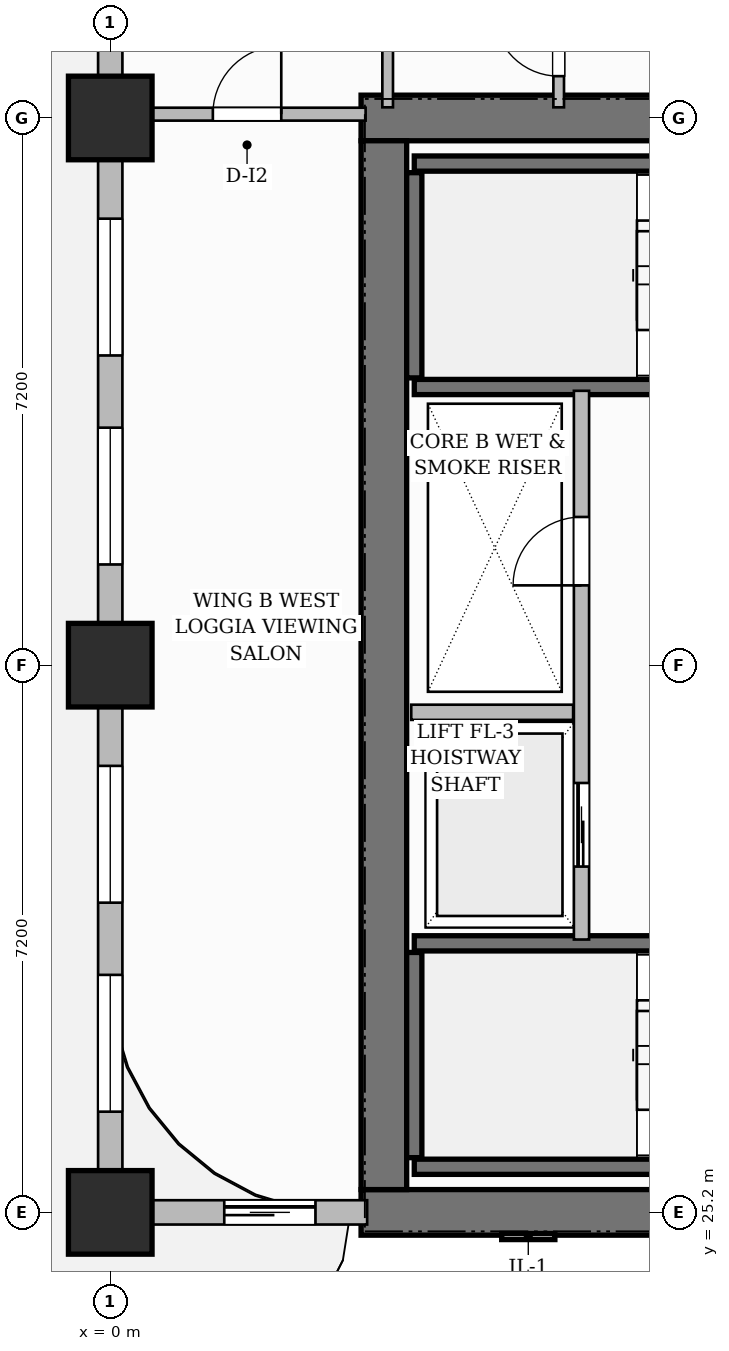
"""IFC4 building model, lengths in metres.
Left out: names, types, materials, properties, quantities, classifications, styles, units other than length and angle.
Written with IfcOpenShell. Run it as: python <this file> out.ifc"""

import sys

from ifc_helpers import new_model, si_unit, direction, frame, frame_2d, origin, origin_2d, place, context, subcontext, project, spatial, rectangle, extrude, source, transform, mapped, element, fill, save


model = new_model("IFC4")
c1 = context("Model", 3, precision=1e-05, world=origin(), true_north=direction((0.0, 1.0)))
c2 = subcontext(c1, "Body", "Model", "MODEL_VIEW")
j1 = project(units=[si_unit("LENGTHUNIT", "METRE"), si_unit("PLANEANGLEUNIT", "RADIAN")], contexts=[c1])
p1 = place(None, origin())
s1 = spatial("IfcSite", under=j1, at=p1, CompositionType="ELEMENT")
p2 = place(p1, origin())
s2 = spatial("IfcBuilding", under=s1, at=p2, CompositionType="ELEMENT")
p3 = place(p2, frame((0.0, 0.0, 32.4)))
s3 = spatial("IfcBuildingStorey", under=s2, at=p3, CompositionType="ELEMENT", Elevation=32.4)
for number, where, z_axis, x_axis in (
    (1, (3.3, 25.2, 0.0), (0.0, 0.0, 1.0), (1.0, 0.0, 0.0)),
    (2, (3.3, 39.6, 0.0), (0.0, 0.0, 1.0), (1.0, 0.0, 0.0)),
):
    element("IfcWall", number, at=place(p3, frame(where, z_axis=z_axis, x_axis=x_axis)), inside=s3, PredefinedType="SHEAR", context=c2, shape_type="SweptSolid", body=[
        extrude(rectangle(XDim=8.4, YDim=0.6, at=frame_2d((4.2, 0.0))), origin(), (0.0, 0.0, 1.0), 3.7),
    ])
p4 = place(p3, frame((3.6, 25.5, 0.0), z_axis=(0.0, 0.0, 1.0), x_axis=(0.0, 1.0, 0.0)))
e3 = element("IfcWall", 3, at=p4, inside=s3, PredefinedType="SHEAR", context=c2, shape_type="SweptSolid", body=[
    extrude(rectangle(XDim=13.8, YDim=0.6, at=frame_2d((6.9, 0.0))), origin(), (0.0, 0.0, 1.0), 3.7),
])
m1 = source(origin(), c2, "Body", "SweptSolid", [
    extrude(rectangle(XDim=1.1, YDim=1.1, at=origin_2d()), origin(), (0.0, 0.0, 1.0), 3.7),
])
for number, where, z_axis, x_axis in (
    (4, (0.0, 25.2, 0.0), (0.0, 0.0, 1.0), (1.0, 0.0, 0.0)),
    (5, (0.0, 32.4, 0.0), (0.0, 0.0, 1.0), (1.0, 0.0, 0.0)),
    (6, (0.0, 39.6, 0.0), (0.0, 0.0, 1.0), (1.0, 0.0, 0.0)),
):
    element("IfcColumn", number, at=place(p3, frame(where, z_axis=z_axis, x_axis=x_axis)), inside=s3, PredefinedType="COLUMN", context=c2, shape_type="MappedRepresentation", body=[
        mapped(m1, transform((0.0, 0.0, 0.0), scale=1.0)),
    ])
p5 = place(p3, frame((4.0, 25.8, 0.0), z_axis=(0.0, 0.0, 1.0), x_axis=(1.0, 0.0, 0.0)))
e7 = element("IfcWall", 7, at=p5, inside=s3, PredefinedType="SHEAR", context=c2, shape_type="SweptSolid", body=[
    extrude(rectangle(XDim=7.1, YDim=0.2, at=frame_2d((3.55, 0.0))), origin(), (0.0, 0.0, 1.0), 3.7),
])
p6 = place(p3, frame((4.0, 25.92, 0.0), z_axis=(0.0, 0.0, 1.0), x_axis=(0.0, 1.0, 0.0)))
e8 = element("IfcWall", 8, at=p6, inside=s3, PredefinedType="SHEAR", context=c2, shape_type="SweptSolid", body=[
    extrude(rectangle(XDim=2.7, YDim=0.2, at=frame_2d((1.35, 0.0))), origin(), (0.0, 0.0, 1.0), 3.7),
])
p7 = place(p3, frame((4.0, 28.74, 0.0), z_axis=(0.0, 0.0, 1.0), x_axis=(1.0, 0.0, 0.0)))
e9 = element("IfcWall", 9, at=p7, inside=s3, PredefinedType="SHEAR", context=c2, shape_type="SweptSolid", body=[
    extrude(rectangle(XDim=7.1, YDim=0.2, at=frame_2d((3.55, 0.0))), origin(), (0.0, 0.0, 1.0), 3.7),
])
p8 = place(p7, frame((5.815, 0.0, 0.0)))
e10 = element("IfcOpeningElement", 10, at=p8, cuts=e9, PredefinedType="OPENING", context=c2, shape_type="SweptSolid", body=[
    extrude(rectangle(XDim=1.05, YDim=2.2, at=frame_2d((0.525, 1.1))), frame((0.0, 0.11, 0.0), z_axis=(0.0, -1.0, 0.0), x_axis=(1.0, 0.0, 0.0)), (0.0, 0.0, 1.0), 0.22),
])
p9 = place(p3, frame((4.0, 39.0, 0.0), z_axis=(0.0, 0.0, 1.0), x_axis=(1.0, 0.0, 0.0)))
e11 = element("IfcWall", 11, at=p9, inside=s3, PredefinedType="SHEAR", context=c2, shape_type="SweptSolid", body=[
    extrude(rectangle(XDim=7.1, YDim=0.2, at=frame_2d((3.55, 0.0))), origin(), (0.0, 0.0, 1.0), 3.7),
])
p10 = place(p3, frame((4.0, 36.18, 0.0), z_axis=(0.0, 0.0, 1.0), x_axis=(0.0, 1.0, 0.0)))
e12 = element("IfcWall", 12, at=p10, inside=s3, PredefinedType="SHEAR", context=c2, shape_type="SweptSolid", body=[
    extrude(rectangle(XDim=2.7, YDim=0.2, at=frame_2d((1.35, 0.0))), origin(), (0.0, 0.0, 1.0), 3.7),
])
p11 = place(p3, frame((4.0, 36.06, 0.0), z_axis=(0.0, 0.0, 1.0), x_axis=(1.0, 0.0, 0.0)))
e13 = element("IfcWall", 13, at=p11, inside=s3, PredefinedType="SHEAR", context=c2, shape_type="SweptSolid", body=[
    extrude(rectangle(XDim=7.1, YDim=0.2, at=frame_2d((3.55, 0.0))), origin(), (0.0, 0.0, 1.0), 3.7),
])
p12 = place(p11, frame((5.815, 0.0, 0.0)))
e14 = element("IfcOpeningElement", 14, at=p12, cuts=e13, PredefinedType="OPENING", context=c2, shape_type="SweptSolid", body=[
    extrude(rectangle(XDim=1.05, YDim=2.2, at=frame_2d((0.525, 1.1))), frame((0.0, 0.11, 0.0), z_axis=(0.0, -1.0, 0.0), x_axis=(1.0, 0.0, 0.0)), (0.0, 0.0, 1.0), 0.22),
])
p13 = place(p3, frame((6.2, 28.79, 0.0), z_axis=(0.0, 0.0, 1.0), x_axis=(0.0, 1.0, 0.0)))
e15 = element("IfcWall", 15, at=p13, inside=s3, PredefinedType="PARTITIONING", context=c2, shape_type="SweptSolid", body=[
    extrude(rectangle(XDim=7.22, YDim=0.2, at=frame_2d((3.61, 0.0))), origin(), (0.0, 0.0, 1.0), 3.45),
])
p14 = place(p13, frame((4.66, 0.0, 0.0)))
e16 = element("IfcOpeningElement", 16, at=p14, cuts=e15, PredefinedType="OPENING", context=c2, shape_type="SweptSolid", body=[
    extrude(rectangle(XDim=0.9, YDim=2.1, at=frame_2d((0.45, 1.05))), frame((0.0, 0.11, 0.0), z_axis=(0.0, -1.0, 0.0), x_axis=(1.0, 0.0, 0.0)), (0.0, 0.0, 1.0), 0.22),
])
p15 = place(p13, frame((0.96, 0.0, 0.0)))
e17 = element("IfcOpeningElement", 17, at=p15, cuts=e15, PredefinedType="OPENING", context=c2, shape_type="SweptSolid", body=[
    extrude(rectangle(XDim=1.1, YDim=2.2, at=frame_2d((0.55, 1.1))), frame((0.0, 0.11, 0.0), z_axis=(0.0, -1.0, 0.0), x_axis=(1.0, 0.0, 0.0)), (0.0, 0.0, 1.0), 0.22),
])
p16 = place(p3, frame((3.96, 31.78, 0.0), z_axis=(0.0, 0.0, 1.0), x_axis=(1.0, 0.0, 0.0)))
e18 = element("IfcWall", 18, at=p16, inside=s3, PredefinedType="PARTITIONING", context=c2, shape_type="SweptSolid", body=[
    extrude(rectangle(XDim=2.13, YDim=0.2, at=frame_2d((1.065, 0.0))), origin(), (0.0, 0.0, 1.0), 3.45),
])
p17 = place(p3, frame((0.24, 39.65, 0.0), z_axis=(0.0, 0.0, 1.0), x_axis=(1.0, 0.0, 0.0)))
e19 = element("IfcWall", 19, at=p17, inside=s3, PredefinedType="PARTITIONING", context=c2, shape_type="SweptSolid", body=[
    extrude(rectangle(XDim=3.12, YDim=0.17, at=frame_2d((1.56, 0.0))), origin(), (0.0, 0.0, 1.0), 3.45),
])
p18 = place(p17, frame((1.11, 0.0, 0.0)))
e20 = element("IfcOpeningElement", 20, at=p18, cuts=e19, PredefinedType="OPENING", context=c2, shape_type="SweptSolid", body=[
    extrude(rectangle(XDim=0.9, YDim=2.15, at=frame_2d((0.45, 1.075))), frame((0.0, 0.095, 0.0), z_axis=(0.0, -1.0, 0.0), x_axis=(1.0, 0.0, 0.0)), (0.0, 0.0, 1.0), 0.19),
])
p19 = place(p3, frame((3.65, 39.74, 0.0), z_axis=(0.0, 0.0, 1.0), x_axis=(0.0, 1.0, 0.0)))
e21 = element("IfcWall", 21, at=p19, inside=s3, PredefinedType="PARTITIONING", context=c2, shape_type="SweptSolid", body=[
    extrude(rectangle(XDim=1.67, YDim=0.14, at=frame_2d((0.835, 0.0))), origin(), (0.0, 0.0, 1.0), 3.45),
])
p20 = place(p3, frame((5.9, 39.74, 0.0), z_axis=(0.0, 0.0, 1.0), x_axis=(0.0, 1.0, 0.0)))
e22 = element("IfcWall", 22, at=p20, inside=s3, PredefinedType="PARTITIONING", context=c2, shape_type="SweptSolid", body=[
    extrude(rectangle(XDim=1.67, YDim=0.14, at=frame_2d((0.835, 0.0))), origin(), (0.0, 0.0, 1.0), 3.45),
])
p21 = place(p20, frame((0.41, 0.0, 0.0)))
e23 = element("IfcOpeningElement", 23, at=p21, cuts=e22, PredefinedType="OPENING", context=c2, shape_type="SweptSolid", body=[
    extrude(rectangle(XDim=0.85, YDim=2.1, at=frame_2d((0.425, 1.05))), frame((0.0, 0.08, 0.0), z_axis=(0.0, -1.0, 0.0), x_axis=(1.0, 0.0, 0.0)), (0.0, 0.0, 1.0), 0.16),
])
p22 = place(p3, frame((0.0, 25.2, 0.0), z_axis=(0.0, 0.0, 1.0), x_axis=(1.0, 0.0, 0.0)))
e24 = element("IfcWall", 24, at=p22, inside=s3, PredefinedType="SOLIDWALL", context=c2, shape_type="SweptSolid", body=[
    extrude(rectangle(XDim=3.38, YDim=0.32, at=frame_2d((1.69, 0.0))), origin(), (0.0, 0.0, 1.0), 3.45),
])
p23 = place(p22, frame((1.5, 0.0, 0.0)))
e25 = element("IfcOpeningElement", 25, at=p23, cuts=e24, PredefinedType="OPENING", context=c2, shape_type="SweptSolid", body=[
    extrude(rectangle(XDim=1.2, YDim=2.2, at=frame_2d((0.6, 1.1))), frame((0.0, 0.17, 0.0), z_axis=(0.0, -1.0, 0.0), x_axis=(1.0, 0.0, 0.0)), (0.0, 0.0, 1.0), 0.34),
])
p24 = place(p3, frame((0.0, 25.25, 0.0), z_axis=(0.0, 0.0, 1.0), x_axis=(0.0, 1.0, 0.0)))
e26 = element("IfcWall", 26, at=p24, inside=s3, PredefinedType="SOLIDWALL", context=c2, shape_type="SweptSolid", body=[
    extrude(rectangle(XDim=21.5, YDim=0.32, at=frame_2d((10.75, 0.0))), origin(), (0.0, 0.0, 1.0), 2.885),
])
p25 = place(p24, frame((1.275, 0.0, 0.8)))
e27 = element("IfcOpeningElement", 27, at=p25, cuts=e26, PredefinedType="OPENING", context=c2, shape_type="SweptSolid", body=[
    extrude(rectangle(XDim=1.8, YDim=1.85, at=frame_2d((0.9, 0.925))), frame((0.0, 0.17, 0.0), z_axis=(0.0, -1.0, 0.0), x_axis=(1.0, 0.0, 0.0)), (0.0, 0.0, 1.0), 0.34),
])
p26 = place(p24, frame((4.025, 0.0, 0.8)))
e28 = element("IfcOpeningElement", 28, at=p26, cuts=e26, PredefinedType="OPENING", context=c2, shape_type="SweptSolid", body=[
    extrude(rectangle(XDim=1.8, YDim=1.85, at=frame_2d((0.9, 0.925))), frame((0.0, 0.17, 0.0), z_axis=(0.0, -1.0, 0.0), x_axis=(1.0, 0.0, 0.0)), (0.0, 0.0, 1.0), 0.34),
])
p27 = place(p24, frame((8.475, 0.0, 0.8)))
e29 = element("IfcOpeningElement", 29, at=p27, cuts=e26, PredefinedType="OPENING", context=c2, shape_type="SweptSolid", body=[
    extrude(rectangle(XDim=1.8, YDim=1.85, at=frame_2d((0.9, 0.925))), frame((0.0, 0.17, 0.0), z_axis=(0.0, -1.0, 0.0), x_axis=(1.0, 0.0, 0.0)), (0.0, 0.0, 1.0), 0.34),
])
p28 = place(p24, frame((11.225, 0.0, 0.8)))
e30 = element("IfcOpeningElement", 30, at=p28, cuts=e26, PredefinedType="OPENING", context=c2, shape_type="SweptSolid", body=[
    extrude(rectangle(XDim=1.8, YDim=1.85, at=frame_2d((0.9, 0.925))), frame((0.0, 0.17, 0.0), z_axis=(0.0, -1.0, 0.0), x_axis=(1.0, 0.0, 0.0)), (0.0, 0.0, 1.0), 0.34),
])
p29 = place(p24, frame((15.697, 0.0, 0.8)))
e31 = element("IfcOpeningElement", 31, at=p29, cuts=e26, PredefinedType="OPENING", context=c2, shape_type="SweptSolid", body=[
    extrude(rectangle(XDim=1.4, YDim=1.85, at=frame_2d((0.7, 0.925))), frame((0.0, 0.17, 0.0), z_axis=(0.0, -1.0, 0.0), x_axis=(1.0, 0.0, 0.0)), (0.0, 0.0, 1.0), 0.34),
])
p30 = place(p24, frame((18.303, 0.0, 0.8)))
e32 = element("IfcOpeningElement", 32, at=p30, cuts=e26, PredefinedType="OPENING", context=c2, shape_type="SweptSolid", body=[
    extrude(rectangle(XDim=1.8, YDim=1.85, at=frame_2d((0.9, 0.925))), frame((0.0, 0.17, 0.0), z_axis=(0.0, -1.0, 0.0), x_axis=(1.0, 0.0, 0.0)), (0.0, 0.0, 1.0), 0.34),
])
m2 = source(origin(), c2, "Body", "SweptSolid", [
    extrude(rectangle(XDim=0.9, YDim=2.1, at=frame_2d((0.45, 1.05))), frame((0.0, 0.025, 0.0), z_axis=(0.0, -1.0, 0.0), x_axis=(1.0, 0.0, 0.0)), (0.0, 0.0, 1.0), 0.05),
])
p31 = place(p14, origin())
e33 = element("IfcDoor", 33, at=p31, inside=s3, OperationType="SINGLE_SWING_LEFT", PredefinedType="DOOR", context=c2, shape_type="MappedRepresentation", body=[
    mapped(m2, transform((0.0, 0.0, 0.0), scale=1.0)),
])
fill(e16, e33)
m3 = source(origin(), c2, "Body", "SweptSolid", [
    extrude(rectangle(XDim=0.9, YDim=2.15, at=frame_2d((0.45, 1.075))), frame((0.0, 0.025, 0.0), z_axis=(0.0, -1.0, 0.0), x_axis=(1.0, 0.0, 0.0)), (0.0, 0.0, 1.0), 0.05),
])
p32 = place(p18, origin())
e34 = element("IfcDoor", 34, at=p32, inside=s3, OperationType="SINGLE_SWING_RIGHT", PredefinedType="DOOR", context=c2, shape_type="MappedRepresentation", body=[
    mapped(m3, transform((0.0, 0.0, 0.0), scale=1.0)),
])
fill(e20, e34)
m4 = source(origin(), c2, "Body", "SweptSolid", [
    extrude(rectangle(XDim=0.85, YDim=2.1, at=frame_2d((0.425, 1.05))), frame((0.0, 0.025, 0.0), z_axis=(0.0, -1.0, 0.0), x_axis=(1.0, 0.0, 0.0)), (0.0, 0.0, 1.0), 0.05),
])
p33 = place(p21, origin())
e35 = element("IfcDoor", 35, at=p33, inside=s3, OperationType="SINGLE_SWING_RIGHT", PredefinedType="DOOR", context=c2, shape_type="MappedRepresentation", body=[
    mapped(m4, transform((0.0, 0.0, 0.0), scale=1.0)),
])
fill(e23, e35)
m5 = source(origin(), c2, "Body", "SweptSolid", [
    extrude(rectangle(XDim=1.1, YDim=2.2, at=frame_2d((0.55, 1.1))), frame((0.0, 0.025, 0.0), z_axis=(0.0, -1.0, 0.0), x_axis=(1.0, 0.0, 0.0)), (0.0, 0.0, 1.0), 0.05),
])
p34 = place(p15, origin())
e36 = element("IfcDoor", 36, at=p34, inside=s3, OperationType="SLIDING_TO_LEFT", PredefinedType="DOOR", context=c2, shape_type="MappedRepresentation", body=[
    mapped(m5, transform((0.0, 0.0, 0.0), scale=1.0)),
])
fill(e17, e36)
m6 = source(origin(), c2, "Body", "SweptSolid", [
    extrude(rectangle(XDim=1.2, YDim=2.2, at=frame_2d((0.6, 1.1))), frame((0.0, 0.025, 0.0), z_axis=(0.0, -1.0, 0.0), x_axis=(1.0, 0.0, 0.0)), (0.0, 0.0, 1.0), 0.05),
])
p35 = place(p23, origin())
e37 = element("IfcDoor", 37, at=p35, inside=s3, OperationType="SLIDING_TO_LEFT", PredefinedType="DOOR", context=c2, shape_type="MappedRepresentation", body=[
    mapped(m6, transform((0.0, 0.0, 0.0), scale=1.0)),
])
fill(e25, e37)
m7 = source(origin(), c2, "Body", "SweptSolid", [
    extrude(rectangle(XDim=1.8, YDim=1.85, at=frame_2d((0.9, 0.925))), frame((0.0, 0.03, 0.0), z_axis=(0.0, -1.0, 0.0), x_axis=(1.0, 0.0, 0.0)), (0.0, 0.0, 1.0), 0.06),
])
p36 = place(p25, origin())
e38 = element("IfcWindow", 38, at=p36, inside=s3, PartitioningType="DOUBLE_PANEL_VERTICAL", PredefinedType="WINDOW", context=c2, shape_type="MappedRepresentation", body=[
    mapped(m7, transform((0.0, 0.0, 0.0), scale=1.0)),
])
fill(e27, e38)
p37 = place(p26, origin())
e39 = element("IfcWindow", 39, at=p37, inside=s3, PartitioningType="DOUBLE_PANEL_VERTICAL", PredefinedType="WINDOW", context=c2, shape_type="MappedRepresentation", body=[
    mapped(m7, transform((0.0, 0.0, 0.0), scale=1.0)),
])
fill(e28, e39)
p38 = place(p27, origin())
e40 = element("IfcWindow", 40, at=p38, inside=s3, PartitioningType="DOUBLE_PANEL_VERTICAL", PredefinedType="WINDOW", context=c2, shape_type="MappedRepresentation", body=[
    mapped(m7, transform((0.0, 0.0, 0.0), scale=1.0)),
])
fill(e29, e40)
p39 = place(p28, origin())
e41 = element("IfcWindow", 41, at=p39, inside=s3, PartitioningType="DOUBLE_PANEL_VERTICAL", PredefinedType="WINDOW", context=c2, shape_type="MappedRepresentation", body=[
    mapped(m7, transform((0.0, 0.0, 0.0), scale=1.0)),
])
fill(e30, e41)
save(model, sys.argv[1])
